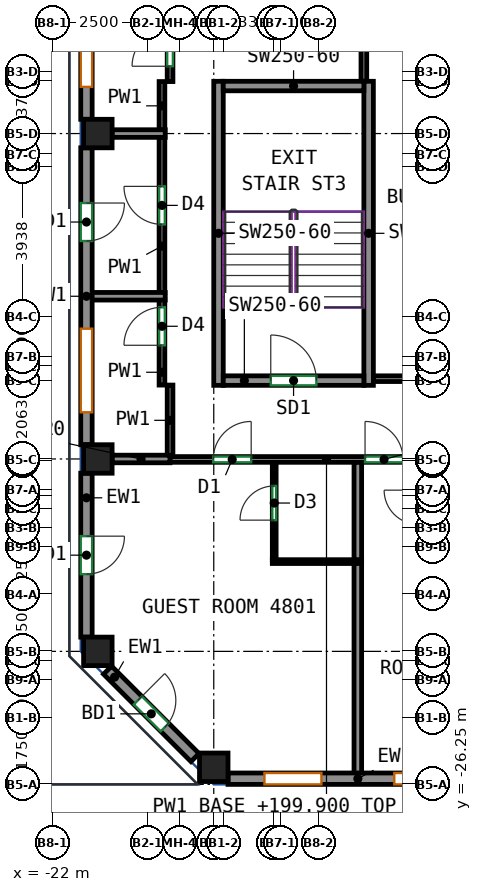
"""IFC4 building model, lengths in metres.
Left out: names, types, materials, properties, quantities, classifications, styles, units other than length and angle.
Written with IfcOpenShell. Run it as: python <this file> out.ifc"""

import sys

from ifc_helpers import new_model, si_unit, direction, frame, frame_2d, origin, origin_2d, place, context, subcontext, project, spatial, rectangle, extrude, source, transform, mapped, element, fill, save


model = new_model("IFC4")
c1 = context("Model", 3, precision=1e-05, world=origin(), true_north=direction((0.0, 1.0)))
c2 = subcontext(c1, "Body", "Model", "MODEL_VIEW")
j1 = project(units=[si_unit("LENGTHUNIT", "METRE"), si_unit("PLANEANGLEUNIT", "RADIAN")], contexts=[c1])
p1 = place(None, origin())
s1 = spatial("IfcSite", under=j1, at=p1, CompositionType="ELEMENT")
p2 = place(p1, origin())
s2 = spatial("IfcBuilding", under=s1, at=p2, CompositionType="ELEMENT")
p3 = place(p2, frame((0.0, 0.0, 199.9)))
s3 = spatial("IfcBuildingStorey", under=s2, at=p3, CompositionType="ELEMENT", Elevation=199.9)
m1 = source(origin(), c2, "Body", "SweptSolid", [
    extrude(rectangle(XDim=0.75, YDim=0.75, at=origin_2d()), origin(), (0.0, 0.0, 1.0), 3.12),
])
for number, where, z_axis, x_axis in (
    (1, (-20.8, -22.75, 0.0), (0.0, 0.0, 1.0), (1.0, 0.0, 0.0)),
    (2, (-20.8, -17.688, 0.0), (0.0, 0.0, 1.0), (1.0, 0.0, 0.0)),
    (3, (-20.8, -9.125, 0.0), (0.0, 0.0, 1.0), (1.0, 0.0, 0.0)),
    (4, (-17.75, -25.8, 0.0), (0.0, 0.0, 1.0), (1.0, 0.0, 0.0)),
):
    element("IfcColumn", number, at=place(p3, frame(where, z_axis=z_axis, x_axis=x_axis)), inside=s3, PredefinedType="COLUMN", context=c2, shape_type="MappedRepresentation", body=[
        mapped(m1, transform((0.0, 0.0, 0.0))),
    ])
m2 = source(origin(), c2, "Body", "SweptSolid", [
    extrude(rectangle(XDim=8.0, YDim=0.25, at=frame_2d((4.0, 0.0))), origin(), (0.0, 0.0, 1.0), 3.12),
])
for number, where, z_axis, x_axis in (
    (5, (-17.625, -15.75, 0.0), (0.0, 0.0, 1.0), (0.0, 1.0, 0.0)),
    (6, (-13.675, -15.75, 0.0), (0.0, 0.0, 1.0), (0.0, 1.0, 0.0)),
):
    element("IfcWall", number, at=place(p3, frame(where, z_axis=z_axis, x_axis=x_axis)), inside=s3, PredefinedType="SHEAR", context=c2, shape_type="MappedRepresentation", body=[
        mapped(m2, transform((0.0, 0.0, 0.0))),
    ])
m3 = source(origin(), c2, "Body", "SweptSolid", [
    extrude(rectangle(XDim=3.7, YDim=0.25, at=frame_2d((1.85, 0.0))), origin(), (0.0, 0.0, 1.0), 3.12),
])
p4 = place(p3, frame((-17.5, -15.625, 0.0), z_axis=(0.0, 0.0, 1.0), x_axis=(1.0, 0.0, 0.0)))
e7 = element("IfcWall", 7, at=p4, inside=s3, PredefinedType="SHEAR", context=c2, shape_type="MappedRepresentation", body=[
    mapped(m3, transform((0.0, 0.0, 0.0))),
])
p5 = place(p4, frame((1.25, 0.0, 0.0)))
e8 = element("IfcOpeningElement", 8, at=p5, cuts=e7, PredefinedType="OPENING", context=c2, shape_type="SweptSolid", body=[
    extrude(rectangle(XDim=1.2, YDim=2.1, at=frame_2d((0.6, 1.05))), frame((0.0, 0.135, 0.0), z_axis=(0.0, -1.0, 0.0), x_axis=(1.0, 0.0, 0.0)), (0.0, 0.0, 1.0), 0.27),
])
p6 = place(p3, frame((-17.5, -7.875, 0.0), z_axis=(0.0, 0.0, 1.0), x_axis=(1.0, 0.0, 0.0)))
e9 = element("IfcWall", 9, at=p6, inside=s3, PredefinedType="SHEAR", context=c2, shape_type="MappedRepresentation", body=[
    mapped(m3, transform((0.0, 0.0, 0.0))),
])
m4 = source(origin(), c2, "Body", "SweptSolid", [
    extrude(rectangle(XDim=6.833, YDim=0.3, at=frame_2d((3.417, 0.0))), origin(), (0.0, 0.0, 1.0), 3.12),
])
p7 = place(p3, frame((-17.375, -26.1, 0.0), z_axis=(0.0, 0.0, 1.0), x_axis=(1.0, 0.0, 0.0)))
e10 = element("IfcWall", 10, at=p7, inside=s3, PredefinedType="SOLIDWALL", context=c2, shape_type="MappedRepresentation", body=[
    mapped(m4, transform((0.0, 0.0, 0.0))),
])
p8 = place(p7, frame((0.958, 0.0, 0.85)))
e11 = element("IfcOpeningElement", 11, at=p8, cuts=e10, PredefinedType="OPENING", context=c2, shape_type="SweptSolid", body=[
    extrude(rectangle(XDim=1.5, YDim=1.95, at=frame_2d((0.75, 0.975))), frame((0.0, 0.16, 0.0), z_axis=(0.0, -1.0, 0.0), x_axis=(1.0, 0.0, 0.0)), (0.0, 0.0, 1.0), 0.32),
])
p9 = place(p7, frame((4.375, 0.0, 0.85)))
e12 = element("IfcOpeningElement", 12, at=p9, cuts=e10, PredefinedType="OPENING", context=c2, shape_type="SweptSolid", body=[
    extrude(rectangle(XDim=1.5, YDim=1.95, at=frame_2d((0.75, 0.975))), frame((0.0, 0.16, 0.0), z_axis=(0.0, -1.0, 0.0), x_axis=(1.0, 0.0, 0.0)), (0.0, 0.0, 1.0), 0.32),
])
m5 = source(origin(), c2, "Body", "SweptSolid", [
    extrude(rectangle(XDim=7.812, YDim=0.3, at=frame_2d((3.906, 0.0))), origin(), (0.0, 0.0, 1.0), 3.12),
])
p10 = place(p3, frame((-21.1, -0.938, 0.0), z_axis=(0.0, 0.0, 1.0), x_axis=(0.0, -1.0, 0.0)))
e13 = element("IfcWall", 13, at=p10, inside=s3, PredefinedType="SOLIDWALL", context=c2, shape_type="MappedRepresentation", body=[
    mapped(m5, transform((0.0, 0.0, 0.0))),
])
p11 = place(p10, frame((1.453, 0.0, 0.0)))
e14 = element("IfcOpeningElement", 14, at=p11, cuts=e13, PredefinedType="OPENING", context=c2, shape_type="SweptSolid", body=[
    extrude(rectangle(XDim=1.0, YDim=2.1, at=frame_2d((0.5, 1.05))), frame((0.0, 0.16, 0.0), z_axis=(0.0, -1.0, 0.0), x_axis=(1.0, 0.0, 0.0)), (0.0, 0.0, 1.0), 0.32),
])
p12 = place(p10, frame((4.76, 0.0, 0.85)))
e15 = element("IfcOpeningElement", 15, at=p12, cuts=e13, PredefinedType="OPENING", context=c2, shape_type="SweptSolid", body=[
    extrude(rectangle(XDim=2.2, YDim=1.95, at=frame_2d((1.1, 0.975))), frame((0.0, 0.16, 0.0), z_axis=(0.0, -1.0, 0.0), x_axis=(1.0, 0.0, 0.0)), (0.0, 0.0, 1.0), 0.32),
])
p13 = place(p3, frame((-21.1, -9.5, 0.0), z_axis=(0.0, 0.0, 1.0), x_axis=(0.0, -1.0, 0.0)))
e16 = element("IfcWall", 16, at=p13, inside=s3, PredefinedType="SOLIDWALL", context=c2, shape_type="MappedRepresentation", body=[
    mapped(m5, transform((0.0, 0.0, 0.0))),
])
p14 = place(p13, frame((1.453, 0.0, 0.0)))
e17 = element("IfcOpeningElement", 17, at=p14, cuts=e16, PredefinedType="OPENING", context=c2, shape_type="SweptSolid", body=[
    extrude(rectangle(XDim=1.0, YDim=2.1, at=frame_2d((0.5, 1.05))), frame((0.0, 0.16, 0.0), z_axis=(0.0, -1.0, 0.0), x_axis=(1.0, 0.0, 0.0)), (0.0, 0.0, 1.0), 0.32),
])
p15 = place(p13, frame((4.759, 0.0, 0.85)))
e18 = element("IfcOpeningElement", 18, at=p15, cuts=e16, PredefinedType="OPENING", context=c2, shape_type="SweptSolid", body=[
    extrude(rectangle(XDim=2.2, YDim=1.95, at=frame_2d((1.1, 0.975))), frame((0.0, 0.16, 0.0), z_axis=(0.0, -1.0, 0.0), x_axis=(1.0, 0.0, 0.0)), (0.0, 0.0, 1.0), 0.32),
])
m6 = source(origin(), c2, "Body", "SweptSolid", [
    extrude(rectangle(XDim=4.312, YDim=0.3, at=frame_2d((2.156, 0.0))), origin(), (0.0, 0.0, 1.0), 3.12),
])
p16 = place(p3, frame((-21.1, -18.062, 0.0), z_axis=(0.0, 0.0, 1.0), x_axis=(0.0, -1.0, 0.0)))
e19 = element("IfcWall", 19, at=p16, inside=s3, PredefinedType="SOLIDWALL", context=c2, shape_type="MappedRepresentation", body=[
    mapped(m6, transform((0.0, 0.0, 0.0))),
])
p17 = place(p16, frame((1.656, 0.0, 0.0)))
e20 = element("IfcOpeningElement", 20, at=p17, cuts=e19, PredefinedType="OPENING", context=c2, shape_type="SweptSolid", body=[
    extrude(rectangle(XDim=1.0, YDim=2.1, at=frame_2d((0.5, 1.05))), frame((0.0, 0.16, 0.0), z_axis=(0.0, -1.0, 0.0), x_axis=(1.0, 0.0, 0.0)), (0.0, 0.0, 1.0), 0.32),
])
m7 = source(origin(), c2, "Body", "SweptSolid", [
    extrude(rectangle(XDim=3.253, YDim=0.3, at=frame_2d((1.626, 0.0))), origin(), (0.0, 0.0, 1.0), 3.12),
])
p18 = place(p3, frame((-20.544, -23.244, 0.0), z_axis=(0.0, 0.0, 1.0), x_axis=(0.707106781187, -0.707106781187, 0.0)))
e21 = element("IfcWall", 21, at=p18, inside=s3, PredefinedType="SOLIDWALL", context=c2, shape_type="MappedRepresentation", body=[
    mapped(m7, transform((0.0, 0.0, 0.0))),
])
p19 = place(p18, frame((1.126, 0.0, 0.0)))
e22 = element("IfcOpeningElement", 22, at=p19, cuts=e21, PredefinedType="OPENING", context=c2, shape_type="SweptSolid", body=[
    extrude(rectangle(XDim=1.0, YDim=2.1, at=frame_2d((0.5, 1.05))), frame((0.0, 0.16, 0.0), z_axis=(0.0, -1.0, 0.0), x_axis=(1.0, 0.0, 0.0)), (0.0, 0.0, 1.0), 0.32),
])
p20 = place(p3, frame((-18.9, -17.7, 0.0), z_axis=(0.0, 0.0, 1.0), x_axis=(1.0, 0.0, 0.0)))
e23 = element("IfcWall", 23, at=p20, inside=s3, PredefinedType="PARTITIONING", context=c2, shape_type="SweptSolid", body=[
    extrude(rectangle(XDim=8.233, YDim=0.15, at=frame_2d((4.116, 0.0))), origin(), (0.0, 0.0, 1.0), 2.52),
])
p21 = place(p20, frame((1.135, 0.0, 0.0)))
e24 = element("IfcOpeningElement", 24, at=p21, cuts=e23, PredefinedType="OPENING", context=c2, shape_type="SweptSolid", body=[
    extrude(rectangle(XDim=1.0, YDim=2.1, at=frame_2d((0.5, 1.05))), frame((0.0, 0.085, 0.0), z_axis=(0.0, -1.0, 0.0), x_axis=(1.0, 0.0, 0.0)), (0.0, 0.0, 1.0), 0.17),
])
p22 = place(p20, frame((5.131, 0.0, 0.0)))
e25 = element("IfcOpeningElement", 25, at=p22, cuts=e23, PredefinedType="OPENING", context=c2, shape_type="SweptSolid", body=[
    extrude(rectangle(XDim=1.0, YDim=2.1, at=frame_2d((0.5, 1.05))), frame((0.0, 0.085, 0.0), z_axis=(0.0, -1.0, 0.0), x_axis=(1.0, 0.0, 0.0)), (0.0, 0.0, 1.0), 0.17),
])
p23 = place(p3, frame((-18.9, -17.598, 0.0), z_axis=(0.0, 0.0, 1.0), x_axis=(0.0, 1.0, 0.0)))
e26 = element("IfcWall", 26, at=p23, inside=s3, PredefinedType="PARTITIONING", context=c2, shape_type="SweptSolid", body=[
    extrude(rectangle(XDim=1.855, YDim=0.15, at=frame_2d((0.927, 0.0))), origin(), (0.0, 0.0, 1.0), 3.12),
])
p24 = place(p3, frame((-19.113, -15.743, 0.0), z_axis=(0.0, 0.0, 1.0), x_axis=(0.0, 1.0, 0.0)))
e27 = element("IfcWall", 27, at=p24, inside=s3, PredefinedType="PARTITIONING", context=c2, shape_type="SweptSolid", body=[
    extrude(rectangle(XDim=2.247, YDim=0.15, at=frame_2d((1.124, 0.0))), origin(), (0.0, 0.0, 1.0), 3.12),
])
p25 = place(p24, frame((1.047, 0.0, 0.0)))
e28 = element("IfcOpeningElement", 28, at=p25, cuts=e27, PredefinedType="OPENING", context=c2, shape_type="SweptSolid", body=[
    extrude(rectangle(XDim=1.0, YDim=2.1, at=frame_2d((0.5, 1.05))), frame((0.0, 0.085, 0.0), z_axis=(0.0, -1.0, 0.0), x_axis=(1.0, 0.0, 0.0)), (0.0, 0.0, 1.0), 0.17),
])
p26 = place(p3, frame((-19.113, -13.316, 0.0), z_axis=(0.0, 0.0, 1.0), x_axis=(0.0, 1.0, 0.0)))
e29 = element("IfcWall", 29, at=p26, inside=s3, PredefinedType="PARTITIONING", context=c2, shape_type="SweptSolid", body=[
    extrude(rectangle(XDim=4.101, YDim=0.15, at=frame_2d((2.05, 0.0))), origin(), (0.0, 0.0, 1.0), 3.12),
])
p27 = place(p26, frame((1.801, 0.0, 0.0)))
e30 = element("IfcOpeningElement", 30, at=p27, cuts=e29, PredefinedType="OPENING", context=c2, shape_type="SweptSolid", body=[
    extrude(rectangle(XDim=1.0, YDim=2.1, at=frame_2d((0.5, 1.05))), frame((0.0, 0.085, 0.0), z_axis=(0.0, -1.0, 0.0), x_axis=(1.0, 0.0, 0.0)), (0.0, 0.0, 1.0), 0.17),
])
p28 = place(p3, frame((-18.9, -7.757, 0.0), z_axis=(0.0, 0.0, 1.0), x_axis=(0.0, 1.0, 0.0)))
e31 = element("IfcWall", 31, at=p28, inside=s3, PredefinedType="PARTITIONING", context=c2, shape_type="SweptSolid", body=[
    extrude(rectangle(XDim=2.824, YDim=0.15, at=frame_2d((1.412, 0.0))), origin(), (0.0, 0.0, 1.0), 3.12),
])
p29 = place(p28, frame((0.403, 0.0, 0.0)))
e32 = element("IfcOpeningElement", 32, at=p29, cuts=e31, PredefinedType="OPENING", context=c2, shape_type="SweptSolid", body=[
    extrude(rectangle(XDim=1.0, YDim=2.1, at=frame_2d((0.5, 1.05))), frame((0.0, 0.085, 0.0), z_axis=(0.0, -1.0, 0.0), x_axis=(1.0, 0.0, 0.0)), (0.0, 0.0, 1.0), 0.17),
])
p30 = place(p3, frame((-19.113, -9.035, 0.0), z_axis=(0.0, 0.0, 1.0), x_axis=(0.0, 1.0, 0.0)))
e33 = element("IfcWall", 33, at=p30, inside=s3, PredefinedType="PARTITIONING", context=c2, shape_type="SweptSolid", body=[
    extrude(rectangle(XDim=1.278, YDim=0.15, at=frame_2d((0.639, 0.0))), origin(), (0.0, 0.0, 1.0), 3.12),
])
p31 = place(p3, frame((-13.8, -7.75, 0.0), z_axis=(0.0, 0.0, 1.0), x_axis=(0.0, 1.0, 0.0)))
e34 = element("IfcWall", 34, at=p31, inside=s3, PredefinedType="PARTITIONING", context=c2, shape_type="SweptSolid", body=[
    extrude(rectangle(XDim=2.817, YDim=0.15, at=frame_2d((1.408, 0.0))), origin(), (0.0, 0.0, 1.0), 3.12),
])
p32 = place(p3, frame((-6.365, -15.575, 0.0), z_axis=(0.0, 0.0, 1.0), x_axis=(-1.0, 0.0, 0.0)))
e35 = element("IfcWall", 35, at=p32, inside=s3, PredefinedType="PARTITIONING", context=c2, shape_type="SweptSolid", body=[
    extrude(rectangle(XDim=7.185, YDim=0.15, at=frame_2d((3.593, 0.0))), origin(), (0.0, 0.0, 1.0), 3.12),
])
p33 = place(p32, frame((3.143, 0.0, 0.0)))
e36 = element("IfcOpeningElement", 36, at=p33, cuts=e35, PredefinedType="OPENING", context=c2, shape_type="SweptSolid", body=[
    extrude(rectangle(XDim=0.9, YDim=2.1, at=frame_2d((0.45, 1.05))), frame((0.0, 0.085, 0.0), z_axis=(0.0, -1.0, 0.0), x_axis=(1.0, 0.0, 0.0)), (0.0, 0.0, 1.0), 0.17),
])
p34 = place(p3, frame((-16.159, -20.338, 0.0), z_axis=(0.0, 0.0, 1.0), x_axis=(0.0, 1.0, 0.0)))
e37 = element("IfcWall", 37, at=p34, inside=s3, PredefinedType="PARTITIONING", context=c2, shape_type="SweptSolid", body=[
    extrude(rectangle(XDim=2.561, YDim=0.1, at=frame_2d((1.28, 0.0))), origin(), (0.0, 0.0, 1.0), 3.12),
])
p35 = place(p34, frame((1.041, 0.0, 0.0)))
e38 = element("IfcOpeningElement", 38, at=p35, cuts=e37, PredefinedType="OPENING", context=c2, shape_type="SweptSolid", body=[
    extrude(rectangle(XDim=0.9, YDim=2.1, at=frame_2d((0.45, 1.05))), frame((0.0, 0.06, 0.0), z_axis=(0.0, -1.0, 0.0), x_axis=(1.0, 0.0, 0.0)), (0.0, 0.0, 1.0), 0.12),
])
p36 = place(p3, frame((-16.209, -20.388, 0.0), z_axis=(0.0, 0.0, 1.0), x_axis=(1.0, 0.0, 0.0)))
e39 = element("IfcWall", 39, at=p36, inside=s3, PredefinedType="PARTITIONING", context=c2, shape_type="SweptSolid", body=[
    extrude(rectangle(XDim=2.35, YDim=0.1, at=frame_2d((1.175, 0.0))), origin(), (0.0, 0.0, 1.0), 3.12),
])
p37 = place(p3, frame((-13.959, -26.0, 0.0), z_axis=(0.0, 0.0, 1.0), x_axis=(0.0, 1.0, 0.0)))
e40 = element("IfcWall", 40, at=p37, inside=s3, PredefinedType="PARTITIONING", context=c2, shape_type="SweptSolid", body=[
    extrude(rectangle(XDim=5.562, YDim=0.2, at=frame_2d((2.781, 0.0))), origin(), (0.0, 0.0, 1.0), 3.12),
])
p38 = place(p3, frame((-20.425, -17.688, 0.0), z_axis=(0.0, 0.0, 1.0), x_axis=(1.0, 0.0, 0.0)))
e41 = element("IfcWall", 41, at=p38, inside=s3, PredefinedType="PARTITIONING", context=c2, shape_type="SweptSolid", body=[
    extrude(rectangle(XDim=1.523, YDim=0.2, at=frame_2d((0.761, 0.0))), origin(), (0.0, 0.0, 1.0), 2.52),
])
p39 = place(p3, frame((-13.959, -20.338, 0.0), z_axis=(0.0, 0.0, 1.0), x_axis=(0.0, 1.0, 0.0)))
e42 = element("IfcWall", 42, at=p39, inside=s3, PredefinedType="PARTITIONING", context=c2, shape_type="SweptSolid", body=[
    extrude(rectangle(XDim=2.561, YDim=0.2, at=frame_2d((1.28, 0.0))), origin(), (0.0, 0.0, 1.0), 3.12),
])
p40 = place(p3, frame((-19.027, -13.406, 0.0), z_axis=(0.0, 0.0, 1.0), x_axis=(-1.0, 0.0, 0.0)))
e43 = element("IfcWall", 43, at=p40, inside=s3, PredefinedType="PARTITIONING", context=c2, shape_type="SweptSolid", body=[
    extrude(rectangle(XDim=1.973, YDim=0.2, at=frame_2d((0.986, 0.0))), origin(), (0.0, 0.0, 1.0), 3.12),
])
p41 = place(p3, frame((-20.425, -9.125, 0.0), z_axis=(0.0, 0.0, 1.0), x_axis=(1.0, 0.0, 0.0)))
e44 = element("IfcWall", 44, at=p41, inside=s3, PredefinedType="PARTITIONING", context=c2, shape_type="SweptSolid", body=[
    extrude(rectangle(XDim=1.398, YDim=0.2, at=frame_2d((0.699, 0.0))), origin(), (0.0, 0.0, 1.0), 3.12),
])
p42 = place(p8, origin())
e45 = element("IfcWindow", 45, at=p42, inside=s3, PartitioningType="SINGLE_PANEL", PredefinedType="WINDOW", context=c2, shape_type="SweptSolid", body=[
    extrude(rectangle(XDim=1.5, YDim=1.95, at=frame_2d((0.75, 0.975))), frame((0.0, 0.03, 0.0), z_axis=(0.0, -1.0, 0.0), x_axis=(1.0, 0.0, 0.0)), (0.0, 0.0, 1.0), 0.06),
])
fill(e11, e45)
p43 = place(p9, origin())
e46 = element("IfcWindow", 46, at=p43, inside=s3, PartitioningType="SINGLE_PANEL", PredefinedType="WINDOW", context=c2, shape_type="SweptSolid", body=[
    extrude(rectangle(XDim=1.5, YDim=1.95, at=frame_2d((0.75, 0.975))), frame((0.0, 0.03, 0.0), z_axis=(0.0, -1.0, 0.0), x_axis=(1.0, 0.0, 0.0)), (0.0, 0.0, 1.0), 0.06),
])
fill(e12, e46)
p44 = place(p12, origin())
e47 = element("IfcWindow", 47, at=p44, inside=s3, PartitioningType="SINGLE_PANEL", PredefinedType="WINDOW", context=c2, shape_type="SweptSolid", body=[
    extrude(rectangle(XDim=2.2, YDim=1.95, at=frame_2d((1.1, 0.975))), frame((0.0, 0.03, 0.0), z_axis=(0.0, -1.0, 0.0), x_axis=(1.0, 0.0, 0.0)), (0.0, 0.0, 1.0), 0.06),
])
fill(e15, e47)
p45 = place(p14, origin())
e48 = element("IfcDoor", 48, at=p45, inside=s3, OperationType="SINGLE_SWING_LEFT", PredefinedType="DOOR", context=c2, shape_type="SweptSolid", body=[
    extrude(rectangle(XDim=1.0, YDim=2.1, at=frame_2d((0.5, 1.05))), frame((0.0, 0.025, 0.0), z_axis=(0.0, -1.0, 0.0), x_axis=(1.0, 0.0, 0.0)), (0.0, 0.0, 1.0), 0.05),
])
fill(e17, e48)
p46 = place(p15, origin())
e49 = element("IfcWindow", 49, at=p46, inside=s3, PartitioningType="SINGLE_PANEL", PredefinedType="WINDOW", context=c2, shape_type="SweptSolid", body=[
    extrude(rectangle(XDim=2.2, YDim=1.95, at=frame_2d((1.1, 0.975))), frame((0.0, 0.03, 0.0), z_axis=(0.0, -1.0, 0.0), x_axis=(1.0, 0.0, 0.0)), (0.0, 0.0, 1.0), 0.06),
])
fill(e18, e49)
p47 = place(p17, origin())
e50 = element("IfcDoor", 50, at=p47, inside=s3, OperationType="SINGLE_SWING_LEFT", PredefinedType="DOOR", context=c2, shape_type="SweptSolid", body=[
    extrude(rectangle(XDim=1.0, YDim=2.1, at=frame_2d((0.5, 1.05))), frame((0.0, 0.025, 0.0), z_axis=(0.0, -1.0, 0.0), x_axis=(1.0, 0.0, 0.0)), (0.0, 0.0, 1.0), 0.05),
])
fill(e20, e50)
p48 = place(p19, origin())
e51 = element("IfcDoor", 51, at=p48, inside=s3, OperationType="SINGLE_SWING_LEFT", PredefinedType="DOOR", context=c2, shape_type="SweptSolid", body=[
    extrude(rectangle(XDim=1.0, YDim=2.1, at=frame_2d((0.5, 1.05))), frame((0.0, 0.025, 0.0), z_axis=(0.0, -1.0, 0.0), x_axis=(1.0, 0.0, 0.0)), (0.0, 0.0, 1.0), 0.05),
])
fill(e22, e51)
p49 = place(p5, origin())
e52 = element("IfcDoor", 52, at=p49, inside=s3, OperationType="DOUBLE_DOOR_SINGLE_SWING", PredefinedType="DOOR", context=c2, shape_type="SweptSolid", body=[
    extrude(rectangle(XDim=1.2, YDim=2.1, at=frame_2d((0.6, 1.05))), frame((0.0, 0.025, 0.0), z_axis=(0.0, -1.0, 0.0), x_axis=(1.0, 0.0, 0.0)), (0.0, 0.0, 1.0), 0.05),
])
fill(e8, e52)
p50 = place(p35, origin())
e53 = element("IfcDoor", 53, at=p50, inside=s3, OperationType="SINGLE_SWING_LEFT", PredefinedType="DOOR", context=c2, shape_type="SweptSolid", body=[
    extrude(rectangle(XDim=0.9, YDim=2.1, at=frame_2d((0.45, 1.05))), frame((0.0, 0.025, 0.0), z_axis=(0.0, -1.0, 0.0), x_axis=(1.0, 0.0, 0.0)), (0.0, 0.0, 1.0), 0.05),
])
fill(e38, e53)
p51 = place(p21, origin())
e54 = element("IfcDoor", 54, at=p51, inside=s3, OperationType="SINGLE_SWING_RIGHT", PredefinedType="DOOR", context=c2, shape_type="SweptSolid", body=[
    extrude(rectangle(XDim=1.0, YDim=2.1, at=frame_2d((0.5, 1.05))), frame((0.0, 0.025, 0.0), z_axis=(0.0, -1.0, 0.0), x_axis=(1.0, 0.0, 0.0)), (0.0, 0.0, 1.0), 0.05),
])
fill(e24, e54)
p52 = place(p22, origin())
e55 = element("IfcDoor", 55, at=p52, inside=s3, OperationType="SINGLE_SWING_LEFT", PredefinedType="DOOR", context=c2, shape_type="SweptSolid", body=[
    extrude(rectangle(XDim=1.0, YDim=2.1, at=frame_2d((0.5, 1.05))), frame((0.0, 0.025, 0.0), z_axis=(0.0, -1.0, 0.0), x_axis=(1.0, 0.0, 0.0)), (0.0, 0.0, 1.0), 0.05),
])
fill(e25, e55)
p53 = place(p25, origin())
e56 = element("IfcDoor", 56, at=p53, inside=s3, OperationType="SINGLE_SWING_LEFT", PredefinedType="DOOR", context=c2, shape_type="SweptSolid", body=[
    extrude(rectangle(XDim=1.0, YDim=2.1, at=frame_2d((0.5, 1.05))), frame((0.0, 0.025, 0.0), z_axis=(0.0, -1.0, 0.0), x_axis=(1.0, 0.0, 0.0)), (0.0, 0.0, 1.0), 0.05),
])
fill(e28, e56)
p54 = place(p27, origin())
e57 = element("IfcDoor", 57, at=p54, inside=s3, OperationType="SINGLE_SWING_RIGHT", PredefinedType="DOOR", context=c2, shape_type="SweptSolid", body=[
    extrude(rectangle(XDim=1.0, YDim=2.1, at=frame_2d((0.5, 1.05))), frame((0.0, 0.025, 0.0), z_axis=(0.0, -1.0, 0.0), x_axis=(1.0, 0.0, 0.0)), (0.0, 0.0, 1.0), 0.05),
])
fill(e30, e57)
p55 = place(p29, origin())
e58 = element("IfcDoor", 58, at=p55, inside=s3, OperationType="SINGLE_SWING_LEFT", PredefinedType="DOOR", context=c2, shape_type="SweptSolid", body=[
    extrude(rectangle(XDim=1.0, YDim=2.1, at=frame_2d((0.5, 1.05))), frame((0.0, 0.025, 0.0), z_axis=(0.0, -1.0, 0.0), x_axis=(1.0, 0.0, 0.0)), (0.0, 0.0, 1.0), 0.05),
])
fill(e32, e58)
save(model, sys.argv[1])
